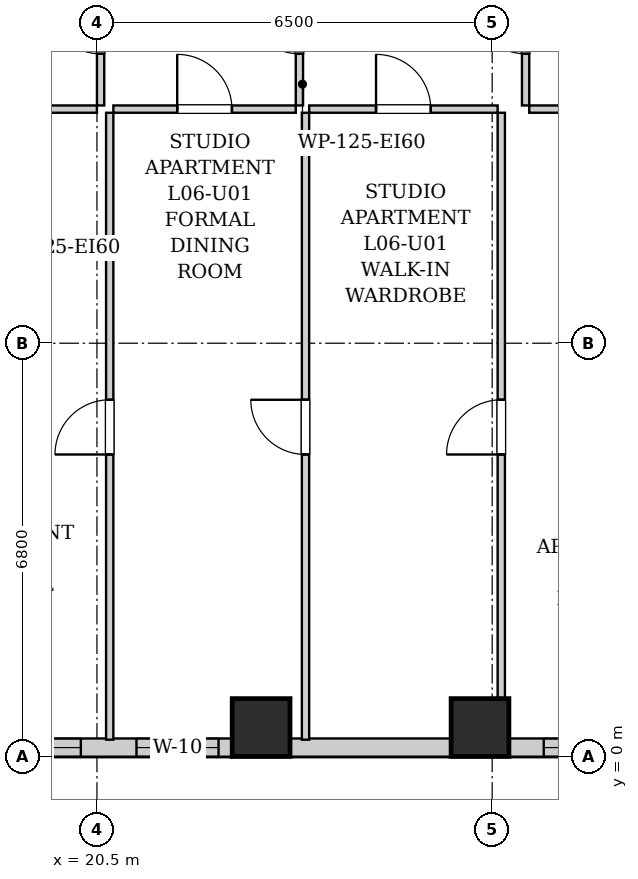
"""IFC4 building model, lengths in metres.
Left out: names, types, materials, properties, quantities, classifications, styles, units other than length and angle.
Written with IfcOpenShell. Run it as: python <this file> out.ifc"""

import sys

from ifc_helpers import new_model, si_unit, direction, frame, frame_2d, origin, origin_2d, place, context, subcontext, project, spatial, rectangle, extrude, element, fill, save


model = new_model("IFC4")
c1 = context("Model", 3, precision=1e-05, world=origin(), true_north=direction((0.0, 1.0)))
c2 = subcontext(c1, "Body", "Model", "MODEL_VIEW")
j1 = project(units=[si_unit("LENGTHUNIT", "METRE"), si_unit("PLANEANGLEUNIT", "RADIAN")], contexts=[c1])
p1 = place(None, origin())
s1 = spatial("IfcSite", under=j1, at=p1, CompositionType="ELEMENT")
p2 = place(p1, origin())
s2 = spatial("IfcBuilding", under=s1, at=p2, CompositionType="ELEMENT")
p3 = place(p2, frame((0.0, 0.0, 29.0)))
s3 = spatial("IfcBuildingStorey", under=s2, at=p3, CompositionType="ELEMENT", Elevation=29.0)
for number, where, z_axis, x_axis in (
    (1, (23.2, 0.48, 0.0), (0.0, 0.0, 1.0), (1.0, 0.0, 0.0)),
    (2, (26.8, 0.48, 0.0), (0.0, 0.0, 1.0), (1.0, 0.0, 0.0)),
):
    element("IfcColumn", number, at=place(p3, frame(where, z_axis=z_axis, x_axis=x_axis)), inside=s3, PredefinedType="COLUMN", context=c2, shape_type="SweptSolid", body=[
        extrude(rectangle(XDim=0.95, YDim=0.95, at=origin_2d()), origin(), (0.0, 0.0, 1.0), 3.2),
    ])
p4 = place(p3, frame((44.0, 0.15, 0.0), z_axis=(0.0, 0.0, 1.0), x_axis=(-1.0, 0.0, 0.0)))
e3 = element("IfcWall", 3, at=p4, inside=s3, PredefinedType="SOLIDWALL", context=c2, shape_type="SweptSolid", body=[
    extrude(rectangle(XDim=28.1, YDim=0.3, at=frame_2d((14.05, 0.0))), origin(), (0.0, 0.0, 1.0), 1.975),
])
p5 = place(p4, frame((26.835, 0.0, 0.55)))
e4 = element("IfcOpeningElement", 4, at=p5, cuts=e3, PredefinedType="OPENING", context=c2, shape_type="SweptSolid", body=[
    extrude(rectangle(XDim=0.85, YDim=1.2, at=frame_2d((0.425, 0.6))), frame((0.0, 0.16, 0.0), z_axis=(0.0, -1.0, 0.0), x_axis=(1.0, 0.0, 0.0)), (0.0, 0.0, 1.0), 0.32),
])
p6 = place(p4, frame((23.765, 0.0, 0.55)))
e5 = element("IfcOpeningElement", 5, at=p6, cuts=e3, PredefinedType="OPENING", context=c2, shape_type="SweptSolid", body=[
    extrude(rectangle(XDim=1.8, YDim=1.2, at=frame_2d((0.9, 0.6))), frame((0.0, 0.16, 0.0), z_axis=(0.0, -1.0, 0.0), x_axis=(1.0, 0.0, 0.0)), (0.0, 0.0, 1.0), 0.32),
])
p7 = place(p4, frame((21.5, 0.0, 0.55)))
e6 = element("IfcOpeningElement", 6, at=p7, cuts=e3, PredefinedType="OPENING", context=c2, shape_type="SweptSolid", body=[
    extrude(rectangle(XDim=1.35, YDim=1.2, at=frame_2d((0.675, 0.6))), frame((0.0, 0.16, 0.0), z_axis=(0.0, -1.0, 0.0), x_axis=(1.0, 0.0, 0.0)), (0.0, 0.0, 1.0), 0.32),
])
p8 = place(p4, frame((14.352, 0.0, 0.55)))
e7 = element("IfcOpeningElement", 7, at=p8, cuts=e3, PredefinedType="OPENING", context=c2, shape_type="SweptSolid", body=[
    extrude(rectangle(XDim=1.8, YDim=1.2, at=frame_2d((0.9, 0.6))), frame((0.0, 0.16, 0.0), z_axis=(0.0, -1.0, 0.0), x_axis=(1.0, 0.0, 0.0)), (0.0, 0.0, 1.0), 0.32),
])
p9 = place(p4, frame((11.435, 0.0, 0.55)))
e8 = element("IfcOpeningElement", 8, at=p9, cuts=e3, PredefinedType="OPENING", context=c2, shape_type="SweptSolid", body=[
    extrude(rectangle(XDim=1.8, YDim=1.2, at=frame_2d((0.9, 0.6))), frame((0.0, 0.16, 0.0), z_axis=(0.0, -1.0, 0.0), x_axis=(1.0, 0.0, 0.0)), (0.0, 0.0, 1.0), 0.32),
])
p10 = place(p4, frame((7.891, 0.0, 0.55)))
e9 = element("IfcOpeningElement", 9, at=p10, cuts=e3, PredefinedType="OPENING", context=c2, shape_type="SweptSolid", body=[
    extrude(rectangle(XDim=1.8, YDim=1.2, at=frame_2d((0.9, 0.6))), frame((0.0, 0.16, 0.0), z_axis=(0.0, -1.0, 0.0), x_axis=(1.0, 0.0, 0.0)), (0.0, 0.0, 1.0), 0.32),
])
p11 = place(p4, frame((4.315, 0.0, 0.55)))
e10 = element("IfcOpeningElement", 10, at=p11, cuts=e3, PredefinedType="OPENING", context=c2, shape_type="SweptSolid", body=[
    extrude(rectangle(XDim=0.85, YDim=1.2, at=frame_2d((0.425, 0.6))), frame((0.0, 0.16, 0.0), z_axis=(0.0, -1.0, 0.0), x_axis=(1.0, 0.0, 0.0)), (0.0, 0.0, 1.0), 0.32),
])
p12 = place(p3, frame((20.56, 10.71, 0.0), z_axis=(0.0, 0.0, 1.0), x_axis=(0.0, 1.0, 0.0)))
e11 = element("IfcWall", 11, at=p12, inside=s3, PredefinedType="PARTITIONING", context=c2, shape_type="SweptSolid", body=[
    extrude(rectangle(XDim=2.6, YDim=0.12, at=frame_2d((1.3, 0.0))), origin(), (0.0, 0.0, 1.0), 2.94),
])
p13 = place(p12, frame((0.85, 0.0, 0.0)))
e12 = element("IfcOpeningElement", 12, at=p13, cuts=e11, PredefinedType="OPENING", context=c2, shape_type="SweptSolid", body=[
    extrude(rectangle(XDim=0.9, YDim=2.05, at=frame_2d((0.45, 1.025))), frame((0.0, 0.07, 0.0), z_axis=(0.0, -1.0, 0.0), x_axis=(1.0, 0.0, 0.0)), (0.0, 0.0, 1.0), 0.14),
])
p14 = place(p3, frame((17.55, 10.65, 0.0), z_axis=(0.0, 0.0, 1.0), x_axis=(1.0, 0.0, 0.0)))
e13 = element("IfcWall", 13, at=p14, inside=s3, PredefinedType="PARTITIONING", context=c2, shape_type="SweptSolid", body=[
    extrude(rectangle(XDim=2.95, YDim=0.12, at=frame_2d((1.475, 0.0))), origin(), (0.0, 0.0, 1.0), 2.94),
])
p15 = place(p14, frame((1.025, 0.0, 0.0)))
e14 = element("IfcOpeningElement", 14, at=p15, cuts=e13, PredefinedType="OPENING", context=c2, shape_type="SweptSolid", body=[
    extrude(rectangle(XDim=0.9, YDim=2.05, at=frame_2d((0.45, 1.025))), frame((0.0, 0.07, 0.0), z_axis=(0.0, -1.0, 0.0), x_axis=(1.0, 0.0, 0.0)), (0.0, 0.0, 1.0), 0.14),
])
p16 = place(p3, frame((23.83, 10.71, 0.0), z_axis=(0.0, 0.0, 1.0), x_axis=(0.0, 1.0, 0.0)))
e15 = element("IfcWall", 15, at=p16, inside=s3, PredefinedType="PARTITIONING", context=c2, shape_type="SweptSolid", body=[
    extrude(rectangle(XDim=2.6, YDim=0.12, at=frame_2d((1.3, 0.0))), origin(), (0.0, 0.0, 1.0), 2.94),
])
p17 = place(p16, frame((0.85, 0.0, 0.0)))
e16 = element("IfcOpeningElement", 16, at=p17, cuts=e15, PredefinedType="OPENING", context=c2, shape_type="SweptSolid", body=[
    extrude(rectangle(XDim=0.9, YDim=2.05, at=frame_2d((0.45, 1.025))), frame((0.0, 0.07, 0.0), z_axis=(0.0, -1.0, 0.0), x_axis=(1.0, 0.0, 0.0)), (0.0, 0.0, 1.0), 0.14),
])
p18 = place(p3, frame((20.77, 10.65, 0.0), z_axis=(0.0, 0.0, 1.0), x_axis=(1.0, 0.0, 0.0)))
e17 = element("IfcWall", 17, at=p18, inside=s3, PredefinedType="PARTITIONING", context=c2, shape_type="SweptSolid", body=[
    extrude(rectangle(XDim=3.0, YDim=0.12, at=frame_2d((1.5, 0.0))), origin(), (0.0, 0.0, 1.0), 2.94),
])
p19 = place(p18, frame((1.05, 0.0, 0.0)))
e18 = element("IfcOpeningElement", 18, at=p19, cuts=e17, PredefinedType="OPENING", context=c2, shape_type="SweptSolid", body=[
    extrude(rectangle(XDim=0.9, YDim=2.05, at=frame_2d((0.45, 1.025))), frame((0.0, 0.07, 0.0), z_axis=(0.0, -1.0, 0.0), x_axis=(1.0, 0.0, 0.0)), (0.0, 0.0, 1.0), 0.14),
])
p20 = place(p3, frame((27.55, 10.71, 0.0), z_axis=(0.0, 0.0, 1.0), x_axis=(0.0, 1.0, 0.0)))
e19 = element("IfcWall", 19, at=p20, inside=s3, PredefinedType="PARTITIONING", context=c2, shape_type="SweptSolid", body=[
    extrude(rectangle(XDim=2.6, YDim=0.12, at=frame_2d((1.3, 0.0))), origin(), (0.0, 0.0, 1.0), 2.94),
])
p21 = place(p20, frame((0.85, 0.0, 0.0)))
e20 = element("IfcOpeningElement", 20, at=p21, cuts=e19, PredefinedType="OPENING", context=c2, shape_type="SweptSolid", body=[
    extrude(rectangle(XDim=0.9, YDim=2.05, at=frame_2d((0.45, 1.025))), frame((0.0, 0.07, 0.0), z_axis=(0.0, -1.0, 0.0), x_axis=(1.0, 0.0, 0.0)), (0.0, 0.0, 1.0), 0.14),
])
p22 = place(p3, frame((23.99, 10.65, 0.0), z_axis=(0.0, 0.0, 1.0), x_axis=(1.0, 0.0, 0.0)))
e21 = element("IfcWall", 21, at=p22, inside=s3, PredefinedType="PARTITIONING", context=c2, shape_type="SweptSolid", body=[
    extrude(rectangle(XDim=3.1, YDim=0.12, at=frame_2d((1.55, 0.0))), origin(), (0.0, 0.0, 1.0), 2.94),
])
p23 = place(p22, frame((1.1, 0.0, 0.0)))
e22 = element("IfcOpeningElement", 22, at=p23, cuts=e21, PredefinedType="OPENING", context=c2, shape_type="SweptSolid", body=[
    extrude(rectangle(XDim=0.9, YDim=2.05, at=frame_2d((0.45, 1.025))), frame((0.0, 0.07, 0.0), z_axis=(0.0, -1.0, 0.0), x_axis=(1.0, 0.0, 0.0)), (0.0, 0.0, 1.0), 0.14),
])
p24 = place(p3, frame((27.61, 10.65, 0.0), z_axis=(0.0, 0.0, 1.0), x_axis=(1.0, 0.0, 0.0)))
e23 = element("IfcWall", 23, at=p24, inside=s3, PredefinedType="PARTITIONING", context=c2, shape_type="SweptSolid", body=[
    extrude(rectangle(XDim=2.7, YDim=0.12, at=frame_2d((1.35, 0.0))), origin(), (0.0, 0.0, 1.0), 2.94),
])
p25 = place(p24, frame((0.9, 0.0, 0.0)))
e24 = element("IfcOpeningElement", 24, at=p25, cuts=e23, PredefinedType="OPENING", context=c2, shape_type="SweptSolid", body=[
    extrude(rectangle(XDim=0.9, YDim=2.05, at=frame_2d((0.45, 1.025))), frame((0.0, 0.07, 0.0), z_axis=(0.0, -1.0, 0.0), x_axis=(1.0, 0.0, 0.0)), (0.0, 0.0, 1.0), 0.14),
])
p26 = place(p3, frame((20.71, 0.28, 0.0), z_axis=(0.0, 0.0, 1.0), x_axis=(0.0, 1.0, 0.0)))
e25 = element("IfcWall", 25, at=p26, inside=s3, PredefinedType="PARTITIONING", context=c2, shape_type="SweptSolid", body=[
    extrude(rectangle(XDim=10.31, YDim=0.12, at=frame_2d((5.155, 0.0))), origin(), (0.0, 0.0, 1.0), 2.94),
])
p27 = place(p26, frame((4.69, 0.0, 0.0)))
e26 = element("IfcOpeningElement", 26, at=p27, cuts=e25, PredefinedType="OPENING", context=c2, shape_type="SweptSolid", body=[
    extrude(rectangle(XDim=0.9, YDim=2.05, at=frame_2d((0.45, 1.025))), frame((0.0, 0.07, 0.0), z_axis=(0.0, -1.0, 0.0), x_axis=(1.0, 0.0, 0.0)), (0.0, 0.0, 1.0), 0.14),
])
p28 = place(p3, frame((23.93, 0.28, 0.0), z_axis=(0.0, 0.0, 1.0), x_axis=(0.0, 1.0, 0.0)))
e27 = element("IfcWall", 27, at=p28, inside=s3, PredefinedType="PARTITIONING", context=c2, shape_type="SweptSolid", body=[
    extrude(rectangle(XDim=10.31, YDim=0.12, at=frame_2d((5.155, 0.0))), origin(), (0.0, 0.0, 1.0), 2.94),
])
p29 = place(p28, frame((4.69, 0.0, 0.0)))
e28 = element("IfcOpeningElement", 28, at=p29, cuts=e27, PredefinedType="OPENING", context=c2, shape_type="SweptSolid", body=[
    extrude(rectangle(XDim=0.9, YDim=2.05, at=frame_2d((0.45, 1.025))), frame((0.0, 0.07, 0.0), z_axis=(0.0, -1.0, 0.0), x_axis=(1.0, 0.0, 0.0)), (0.0, 0.0, 1.0), 0.14),
])
p30 = place(p3, frame((27.15, 0.28, 0.0), z_axis=(0.0, 0.0, 1.0), x_axis=(0.0, 1.0, 0.0)))
e29 = element("IfcWall", 29, at=p30, inside=s3, PredefinedType="PARTITIONING", context=c2, shape_type="SweptSolid", body=[
    extrude(rectangle(XDim=10.31, YDim=0.12, at=frame_2d((5.155, 0.0))), origin(), (0.0, 0.0, 1.0), 2.94),
])
p31 = place(p30, frame((4.69, 0.0, 0.0)))
e30 = element("IfcOpeningElement", 30, at=p31, cuts=e29, PredefinedType="OPENING", context=c2, shape_type="SweptSolid", body=[
    extrude(rectangle(XDim=0.9, YDim=2.05, at=frame_2d((0.45, 1.025))), frame((0.0, 0.07, 0.0), z_axis=(0.0, -1.0, 0.0), x_axis=(1.0, 0.0, 0.0)), (0.0, 0.0, 1.0), 0.14),
])
p32 = place(p13, origin())
e31 = element("IfcDoor", 31, at=p32, inside=s3, OperationType="SINGLE_SWING_RIGHT", PredefinedType="DOOR", context=c2, shape_type="SweptSolid", body=[
    extrude(rectangle(XDim=0.9, YDim=2.05, at=frame_2d((0.45, 1.025))), frame((0.0, 0.025, 0.0), z_axis=(0.0, -1.0, 0.0), x_axis=(1.0, 0.0, 0.0)), (0.0, 0.0, 1.0), 0.05),
])
fill(e12, e31)
p33 = place(p17, origin())
e32 = element("IfcDoor", 32, at=p33, inside=s3, OperationType="SINGLE_SWING_RIGHT", PredefinedType="DOOR", context=c2, shape_type="SweptSolid", body=[
    extrude(rectangle(XDim=0.9, YDim=2.05, at=frame_2d((0.45, 1.025))), frame((0.0, 0.025, 0.0), z_axis=(0.0, -1.0, 0.0), x_axis=(1.0, 0.0, 0.0)), (0.0, 0.0, 1.0), 0.05),
])
fill(e16, e32)
p34 = place(p19, origin())
e33 = element("IfcDoor", 33, at=p34, inside=s3, OperationType="SINGLE_SWING_LEFT", PredefinedType="DOOR", context=c2, shape_type="SweptSolid", body=[
    extrude(rectangle(XDim=0.9, YDim=2.05, at=frame_2d((0.45, 1.025))), frame((0.0, 0.025, 0.0), z_axis=(0.0, -1.0, 0.0), x_axis=(1.0, 0.0, 0.0)), (0.0, 0.0, 1.0), 0.05),
])
fill(e18, e33)
p35 = place(p21, origin())
e34 = element("IfcDoor", 34, at=p35, inside=s3, OperationType="SINGLE_SWING_RIGHT", PredefinedType="DOOR", context=c2, shape_type="SweptSolid", body=[
    extrude(rectangle(XDim=0.9, YDim=2.05, at=frame_2d((0.45, 1.025))), frame((0.0, 0.025, 0.0), z_axis=(0.0, -1.0, 0.0), x_axis=(1.0, 0.0, 0.0)), (0.0, 0.0, 1.0), 0.05),
])
fill(e20, e34)
p36 = place(p23, origin())
e35 = element("IfcDoor", 35, at=p36, inside=s3, OperationType="SINGLE_SWING_LEFT", PredefinedType="DOOR", context=c2, shape_type="SweptSolid", body=[
    extrude(rectangle(XDim=0.9, YDim=2.05, at=frame_2d((0.45, 1.025))), frame((0.0, 0.025, 0.0), z_axis=(0.0, -1.0, 0.0), x_axis=(1.0, 0.0, 0.0)), (0.0, 0.0, 1.0), 0.05),
])
fill(e22, e35)
p37 = place(p27, origin())
e36 = element("IfcDoor", 36, at=p37, inside=s3, OperationType="SINGLE_SWING_LEFT", PredefinedType="DOOR", context=c2, shape_type="SweptSolid", body=[
    extrude(rectangle(XDim=0.9, YDim=2.05, at=frame_2d((0.45, 1.025))), frame((0.0, 0.025, 0.0), z_axis=(0.0, -1.0, 0.0), x_axis=(1.0, 0.0, 0.0)), (0.0, 0.0, 1.0), 0.05),
])
fill(e26, e36)
p38 = place(p29, origin())
e37 = element("IfcDoor", 37, at=p38, inside=s3, OperationType="SINGLE_SWING_RIGHT", PredefinedType="DOOR", context=c2, shape_type="SweptSolid", body=[
    extrude(rectangle(XDim=0.9, YDim=2.05, at=frame_2d((0.45, 1.025))), frame((0.0, 0.025, 0.0), z_axis=(0.0, -1.0, 0.0), x_axis=(1.0, 0.0, 0.0)), (0.0, 0.0, 1.0), 0.05),
])
fill(e28, e37)
p39 = place(p31, origin())
e38 = element("IfcDoor", 38, at=p39, inside=s3, OperationType="SINGLE_SWING_LEFT", PredefinedType="DOOR", context=c2, shape_type="SweptSolid", body=[
    extrude(rectangle(XDim=0.9, YDim=2.05, at=frame_2d((0.45, 1.025))), frame((0.0, 0.025, 0.0), z_axis=(0.0, -1.0, 0.0), x_axis=(1.0, 0.0, 0.0)), (0.0, 0.0, 1.0), 0.05),
])
fill(e30, e38)
p40 = place(p6, origin())
e39 = element("IfcWindow", 39, at=p40, inside=s3, PartitioningType="DOUBLE_PANEL_VERTICAL", PredefinedType="WINDOW", context=c2, shape_type="SweptSolid", body=[
    extrude(rectangle(XDim=1.8, YDim=1.2, at=frame_2d((0.9, 0.6))), frame((0.0, 0.03, 0.0), z_axis=(0.0, -1.0, 0.0), x_axis=(1.0, 0.0, 0.0)), (0.0, 0.0, 1.0), 0.06),
])
fill(e5, e39)
p41 = place(p7, origin())
e40 = element("IfcWindow", 40, at=p41, inside=s3, PartitioningType="SINGLE_PANEL", PredefinedType="WINDOW", context=c2, shape_type="SweptSolid", body=[
    extrude(rectangle(XDim=1.35, YDim=1.2, at=frame_2d((0.675, 0.6))), frame((0.0, 0.03, 0.0), z_axis=(0.0, -1.0, 0.0), x_axis=(1.0, 0.0, 0.0)), (0.0, 0.0, 1.0), 0.06),
])
fill(e6, e40)
p42 = place(p8, origin())
e41 = element("IfcWindow", 41, at=p42, inside=s3, PartitioningType="DOUBLE_PANEL_VERTICAL", PredefinedType="WINDOW", context=c2, shape_type="SweptSolid", body=[
    extrude(rectangle(XDim=1.8, YDim=1.2, at=frame_2d((0.9, 0.6))), frame((0.0, 0.03, 0.0), z_axis=(0.0, -1.0, 0.0), x_axis=(1.0, 0.0, 0.0)), (0.0, 0.0, 1.0), 0.06),
])
fill(e7, e41)
save(model, sys.argv[1])
